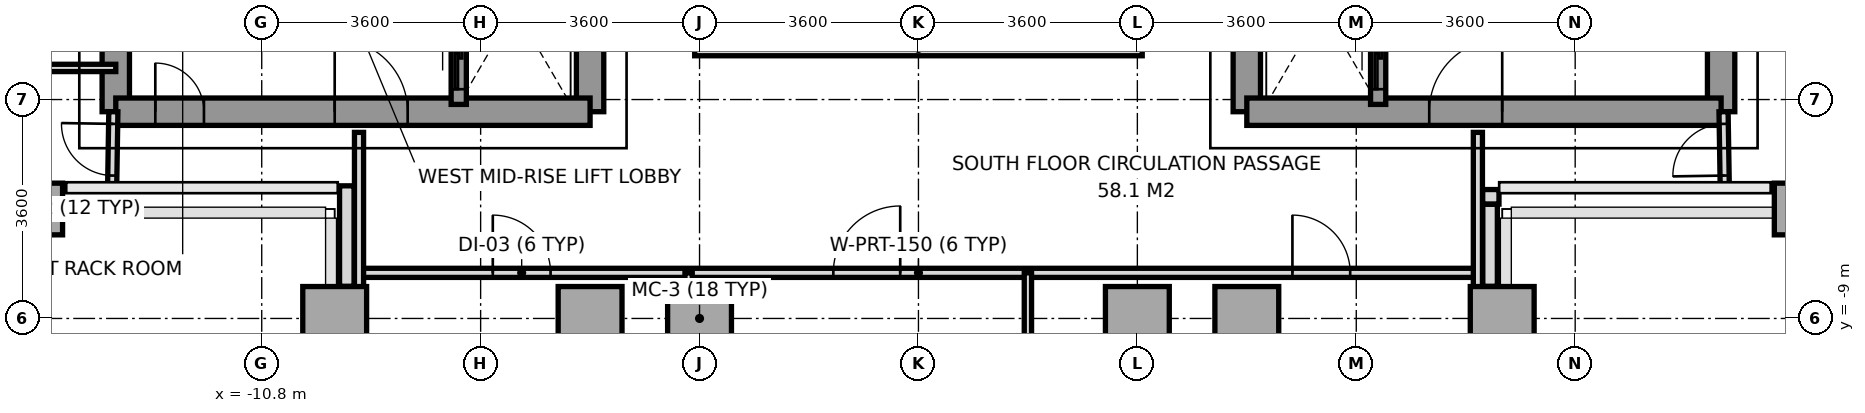
"""IFC4 building model, lengths in metres.
Left out: names, types, materials, properties, quantities, classifications, styles, units other than length and angle.
Written with IfcOpenShell. Run it as: python <this file> out.ifc"""

import sys

from ifc_helpers import new_model, si_unit, direction, frame, frame_2d, origin, origin_2d, place, context, subcontext, project, spatial, rectangle, extrude, source, transform, mapped, element, fill, save


model = new_model("IFC4")
c1 = context("Model", 3, precision=1e-05, world=origin(), true_north=direction((0.0, 1.0)))
c2 = subcontext(c1, "Body", "Model", "MODEL_VIEW")
j1 = project(units=[si_unit("LENGTHUNIT", "METRE"), si_unit("PLANEANGLEUNIT", "RADIAN")], contexts=[c1])
p1 = place(None, origin())
s1 = spatial("IfcSite", under=j1, at=p1, CompositionType="ELEMENT")
p2 = place(p1, origin())
s2 = spatial("IfcBuilding", under=s1, at=p2, CompositionType="ELEMENT")
p3 = place(p2, frame((0.0, 0.0, 141.4)))
s3 = spatial("IfcBuildingStorey", under=s2, at=p3, CompositionType="ELEMENT", Elevation=141.4)
m1 = source(origin(), c2, "Body", "SweptSolid", [
    extrude(rectangle(XDim=0.65, YDim=0.85, at=origin_2d()), origin(), (0.0, 0.0, 1.0), 3.2),
])
p4 = place(p3, frame((-14.4, -7.2, 0.0), z_axis=(0.0, 0.0, 1.0), x_axis=(1.0, 0.0, 0.0)))
e1 = element("IfcColumn", 1, at=p4, inside=s3, PredefinedType="COLUMN", context=c2, shape_type="MappedRepresentation", body=[
    mapped(m1, transform((0.0, 0.0, 0.0), x_axis=(1.0, 0.0, 0.0), y_axis=(0.0, 1.0, 0.0), z_axis=(0.0, 0.0, 1.0), scale=1.0)),
])
m2 = source(origin(), c2, "Body", "SweptSolid", [
    extrude(rectangle(XDim=1.05, YDim=1.05, at=origin_2d()), origin(), (0.0, 0.0, 1.0), 3.2),
])
for number, where, z_axis, x_axis in (
    (2, (-9.6, -9.0, 0.0), (0.0, 0.0, 1.0), (1.0, 0.0, 0.0)),
    (3, (-5.4, -9.0, 0.0), (0.0, 0.0, 1.0), (1.0, 0.0, 0.0)),
    (4, (-3.6, -9.0, 0.0), (0.0, 0.0, 1.0), (1.0, 0.0, 0.0)),
    (5, (3.6, -9.0, 0.0), (0.0, 0.0, 1.0), (1.0, 0.0, 0.0)),
    (6, (5.4, -9.0, 0.0), (0.0, 0.0, 1.0), (1.0, 0.0, 0.0)),
    (7, (9.6, -9.0, 0.0), (0.0, 0.0, 1.0), (1.0, 0.0, 0.0)),
):
    element("IfcColumn", number, at=place(p3, frame(where, z_axis=z_axis, x_axis=x_axis)), inside=s3, PredefinedType="COLUMN", context=c2, shape_type="MappedRepresentation", body=[
        mapped(m2, transform((0.0, 0.0, 0.0), x_axis=(1.0, 0.0, 0.0), y_axis=(0.0, 1.0, 0.0), z_axis=(0.0, 0.0, 1.0), scale=1.0)),
    ])
p5 = place(p3, frame((14.4, -7.2, 0.0), z_axis=(0.0, 0.0, 1.0), x_axis=(1.0, 0.0, 0.0)))
e8 = element("IfcColumn", 8, at=p5, inside=s3, PredefinedType="COLUMN", context=c2, shape_type="MappedRepresentation", body=[
    mapped(m1, transform((0.0, 0.0, 0.0), x_axis=(1.0, 0.0, 0.0), y_axis=(0.0, 1.0, 0.0), z_axis=(0.0, 0.0, 1.0), scale=1.0)),
])
p6 = place(p3, frame((9.547, -7.0, 0.0), z_axis=(0.0, 0.0, 1.0), x_axis=(-1.0, 0.0, 0.0)))
e9 = element("IfcWall", 9, at=p6, inside=s3, PredefinedType="PARAPET", context=c2, shape_type="SweptSolid", body=[
    extrude(rectangle(XDim=0.269, YDim=0.24, at=frame_2d((0.135, 0.0))), origin(), (0.0, 0.0, 1.0), 1.15),
])
p7 = place(p3, frame((9.4, -7.123, 0.0), z_axis=(0.0, 0.0, 1.0), x_axis=(0.0, -1.0, 0.0)))
e10 = element("IfcWall", 10, at=p7, inside=s3, PredefinedType="PARAPET", context=c2, shape_type="SweptSolid", body=[
    extrude(rectangle(XDim=1.349, YDim=0.24, at=frame_2d((0.674, 0.0))), origin(), (0.0, 0.0, 1.0), 1.15),
])
p8 = place(p3, frame((-9.4, -8.472, 0.0), z_axis=(0.0, 0.0, 1.0), x_axis=(0.0, 1.0, 0.0)))
e11 = element("IfcWall", 11, at=p8, inside=s3, PredefinedType="PARAPET", context=c2, shape_type="SweptSolid", body=[
    extrude(rectangle(XDim=1.653, YDim=0.24, at=frame_2d((0.827, 0.0))), origin(), (0.0, 0.0, 1.0), 1.15),
])
p9 = place(p3, frame((-13.2, -5.6, 0.0), z_axis=(0.0, 0.0, 1.0), x_axis=(0.0, 1.0, 0.0)))
e12 = element("IfcWall", 12, at=p9, inside=s3, PredefinedType="SHEAR", context=c2, shape_type="SweptSolid", body=[
    extrude(rectangle(XDim=11.2, YDim=0.45, at=frame_2d((5.6, 0.0))), origin(), (0.0, 0.0, 1.0), 3.2),
])
p10 = place(p3, frame((-5.4, -5.6, 0.0), z_axis=(0.0, 0.0, 1.0), x_axis=(0.0, 1.0, 0.0)))
e13 = element("IfcWall", 13, at=p10, inside=s3, PredefinedType="SHEAR", context=c2, shape_type="SweptSolid", body=[
    extrude(rectangle(XDim=12.5, YDim=0.45, at=frame_2d((6.25, 0.0))), origin(), (0.0, 0.0, 1.0), 3.2),
])
p11 = place(p10, frame((4.55, 0.0, 0.0)))
e14 = element("IfcOpeningElement", 14, at=p11, cuts=e13, PredefinedType="OPENING", context=c2, shape_type="SweptSolid", body=[
    extrude(rectangle(XDim=1.2, YDim=2.2, at=frame_2d((0.6, 1.1))), frame((0.0, 0.235, 0.0), z_axis=(0.0, -1.0, 0.0), x_axis=(1.0, 0.0, 0.0)), (0.0, 0.0, 1.0), 0.47),
])
p12 = place(p10, frame((6.86, 0.0, 0.0)))
e15 = element("IfcOpeningElement", 15, at=p12, cuts=e13, PredefinedType="OPENING", context=c2, shape_type="SweptSolid", body=[
    extrude(rectangle(XDim=0.8, YDim=2.1, at=frame_2d((0.4, 1.05))), frame((0.0, 0.235, 0.0), z_axis=(0.0, -1.0, 0.0), x_axis=(1.0, 0.0, 0.0)), (0.0, 0.0, 1.0), 0.47),
])
p13 = place(p3, frame((-13.2, -5.6, 0.0), z_axis=(0.0, 0.0, 1.0), x_axis=(1.0, 0.0, 0.0)))
e16 = element("IfcWall", 16, at=p13, inside=s3, PredefinedType="SHEAR", context=c2, shape_type="SweptSolid", body=[
    extrude(rectangle(XDim=7.8, YDim=0.45, at=frame_2d((3.9, 0.0))), origin(), (0.0, 0.0, 1.0), 3.2),
])
p14 = place(p13, frame((3.6, 0.0, 0.0)))
e17 = element("IfcOpeningElement", 17, at=p14, cuts=e16, PredefinedType="OPENING", context=c2, shape_type="SweptSolid", body=[
    extrude(rectangle(XDim=1.2, YDim=2.2, at=frame_2d((0.6, 1.1))), frame((0.0, 0.235, 0.0), z_axis=(0.0, -1.0, 0.0), x_axis=(1.0, 0.0, 0.0)), (0.0, 0.0, 1.0), 0.47),
])
p15 = place(p13, frame((0.65, 0.0, 0.0)))
e18 = element("IfcOpeningElement", 18, at=p15, cuts=e16, PredefinedType="OPENING", context=c2, shape_type="SweptSolid", body=[
    extrude(rectangle(XDim=0.8, YDim=2.1, at=frame_2d((0.4, 1.05))), frame((0.0, 0.235, 0.0), z_axis=(0.0, -1.0, 0.0), x_axis=(1.0, 0.0, 0.0)), (0.0, 0.0, 1.0), 0.47),
])
p16 = place(p3, frame((13.2, -5.6, 0.0), z_axis=(0.0, 0.0, 1.0), x_axis=(0.0, 1.0, 0.0)))
e19 = element("IfcWall", 19, at=p16, inside=s3, PredefinedType="SHEAR", context=c2, shape_type="SweptSolid", body=[
    extrude(rectangle(XDim=11.2, YDim=0.45, at=frame_2d((5.6, 0.0))), origin(), (0.0, 0.0, 1.0), 3.2),
])
p17 = place(p3, frame((5.4, -5.6, 0.0), z_axis=(0.0, 0.0, 1.0), x_axis=(0.0, 1.0, 0.0)))
e20 = element("IfcWall", 20, at=p17, inside=s3, PredefinedType="SHEAR", context=c2, shape_type="SweptSolid", body=[
    extrude(rectangle(XDim=12.5, YDim=0.45, at=frame_2d((6.25, 0.0))), origin(), (0.0, 0.0, 1.0), 3.2),
])
p18 = place(p17, frame((4.55, 0.0, 0.0)))
e21 = element("IfcOpeningElement", 21, at=p18, cuts=e20, PredefinedType="OPENING", context=c2, shape_type="SweptSolid", body=[
    extrude(rectangle(XDim=1.2, YDim=2.2, at=frame_2d((0.6, 1.1))), frame((0.0, 0.235, 0.0), z_axis=(0.0, -1.0, 0.0), x_axis=(1.0, 0.0, 0.0)), (0.0, 0.0, 1.0), 0.47),
])
p19 = place(p17, frame((6.86, 0.0, 0.0)))
e22 = element("IfcOpeningElement", 22, at=p19, cuts=e20, PredefinedType="OPENING", context=c2, shape_type="SweptSolid", body=[
    extrude(rectangle(XDim=0.8, YDim=2.1, at=frame_2d((0.4, 1.05))), frame((0.0, 0.235, 0.0), z_axis=(0.0, -1.0, 0.0), x_axis=(1.0, 0.0, 0.0)), (0.0, 0.0, 1.0), 0.47),
])
p20 = place(p3, frame((5.4, -5.6, 0.0), z_axis=(0.0, 0.0, 1.0), x_axis=(1.0, 0.0, 0.0)))
e23 = element("IfcWall", 23, at=p20, inside=s3, PredefinedType="SHEAR", context=c2, shape_type="SweptSolid", body=[
    extrude(rectangle(XDim=7.8, YDim=0.45, at=frame_2d((3.9, 0.0))), origin(), (0.0, 0.0, 1.0), 3.2),
])
p21 = place(p20, frame((3.0, 0.0, 0.0)))
e24 = element("IfcOpeningElement", 24, at=p21, cuts=e23, PredefinedType="OPENING", context=c2, shape_type="SweptSolid", body=[
    extrude(rectangle(XDim=1.2, YDim=2.2, at=frame_2d((0.6, 1.1))), frame((0.0, 0.235, 0.0), z_axis=(0.0, -1.0, 0.0), x_axis=(1.0, 0.0, 0.0)), (0.0, 0.0, 1.0), 0.47),
])
p22 = place(p3, frame((-7.56, -5.48, 0.0), z_axis=(0.0, 0.0, 1.0), x_axis=(0.0, 1.0, 0.0)))
e25 = element("IfcWall", 25, at=p22, inside=s3, PredefinedType="SOLIDWALL", context=c2, shape_type="SweptSolid", body=[
    extrude(rectangle(XDim=1.6, YDim=0.25, at=frame_2d((0.8, 0.0))), origin(), (0.0, 0.0, 1.0), 3.2),
])
p23 = place(p22, frame((0.25, 0.0, 0.0)))
e26 = element("IfcOpeningElement", 26, at=p23, cuts=e25, PredefinedType="OPENING", context=c2, shape_type="SweptSolid", body=[
    extrude(rectangle(XDim=1.1, YDim=2.2, at=frame_2d((0.55, 1.1))), frame((0.0, 0.135, 0.0), z_axis=(0.0, -1.0, 0.0), x_axis=(1.0, 0.0, 0.0)), (0.0, 0.0, 1.0), 0.27),
])
p24 = place(p3, frame((7.56, -5.48, 0.0), z_axis=(0.0, 0.0, 1.0), x_axis=(0.0, 1.0, 0.0)))
e27 = element("IfcWall", 27, at=p24, inside=s3, PredefinedType="SOLIDWALL", context=c2, shape_type="SweptSolid", body=[
    extrude(rectangle(XDim=1.6, YDim=0.25, at=frame_2d((0.8, 0.0))), origin(), (0.0, 0.0, 1.0), 3.2),
])
p25 = place(p24, frame((0.25, 0.0, 0.0)))
e28 = element("IfcOpeningElement", 28, at=p25, cuts=e27, PredefinedType="OPENING", context=c2, shape_type="SweptSolid", body=[
    extrude(rectangle(XDim=1.1, YDim=2.2, at=frame_2d((0.55, 1.1))), frame((0.0, 0.135, 0.0), z_axis=(0.0, -1.0, 0.0), x_axis=(1.0, 0.0, 0.0)), (0.0, 0.0, 1.0), 0.27),
])
p26 = place(p3, frame((-9.2, -8.25, 0.0), z_axis=(0.0, 0.0, 1.0), x_axis=(1.0, 0.0, 0.0)))
e29 = element("IfcWall", 29, at=p26, inside=s3, PredefinedType="PARTITIONING", context=c2, shape_type="SweptSolid", body=[
    extrude(rectangle(XDim=18.4, YDim=0.15, at=frame_2d((9.2, 0.0))), origin(), (0.0, 0.0, 1.0), 2.75),
])
p27 = place(p26, frame((2.2, 0.0, 0.0)))
e30 = element("IfcOpeningElement", 30, at=p27, cuts=e29, PredefinedType="OPENING", context=c2, shape_type="SweptSolid", body=[
    extrude(rectangle(XDim=0.95, YDim=2.15, at=frame_2d((0.475, 1.075))), frame((0.0, 0.085, 0.0), z_axis=(0.0, -1.0, 0.0), x_axis=(1.0, 0.0, 0.0)), (0.0, 0.0, 1.0), 0.17),
])
p28 = place(p26, frame((7.8, 0.0, 0.0)))
e31 = element("IfcOpeningElement", 31, at=p28, cuts=e29, PredefinedType="OPENING", context=c2, shape_type="SweptSolid", body=[
    extrude(rectangle(XDim=1.1, YDim=2.2, at=frame_2d((0.55, 1.1))), frame((0.0, 0.085, 0.0), z_axis=(0.0, -1.0, 0.0), x_axis=(1.0, 0.0, 0.0)), (0.0, 0.0, 1.0), 0.17),
])
p29 = place(p26, frame((15.35, 0.0, 0.0)))
e32 = element("IfcOpeningElement", 32, at=p29, cuts=e29, PredefinedType="OPENING", context=c2, shape_type="SweptSolid", body=[
    extrude(rectangle(XDim=0.95, YDim=2.15, at=frame_2d((0.475, 1.075))), frame((0.0, 0.085, 0.0), z_axis=(0.0, -1.0, 0.0), x_axis=(1.0, 0.0, 0.0)), (0.0, 0.0, 1.0), 0.17),
])
for number, where, z_axis, x_axis in (
    (33, (-9.2, -15.68, 0.0), (0.0, 0.0, 1.0), (0.0, 1.0, 0.0)),
    (34, (9.2, -15.68, 0.0), (0.0, 0.0, 1.0), (0.0, 1.0, 0.0)),
):
    element("IfcWall", number, at=place(p3, frame(where, z_axis=z_axis, x_axis=x_axis)), inside=s3, PredefinedType="PARTITIONING", context=c2, shape_type="SweptSolid", body=[
        extrude(rectangle(XDim=9.74, YDim=0.15, at=frame_2d((4.87, 0.0))), origin(), (0.0, 0.0, 1.0), 2.7),
    ])
for number, where, z_axis, x_axis in (
    (35, (-3.78, -24.65, 0.0), (0.0, 0.0, 1.0), (0.0, 1.0, 0.0)),
    (36, (1.8, -24.65, 0.0), (0.0, 0.0, 1.0), (0.0, 1.0, 0.0)),
):
    element("IfcWall", number, at=place(p3, frame(where, z_axis=z_axis, x_axis=x_axis)), inside=s3, PredefinedType="PARTITIONING", context=c2, shape_type="SweptSolid", body=[
        extrude(rectangle(XDim=16.4, YDim=0.12, at=frame_2d((8.2, 0.0))), origin(), (0.0, 0.0, 1.0), 2.7),
    ])
p30 = place(p3, frame((-13.26, -6.85, 0.0), z_axis=(0.0, 0.0, 1.0), x_axis=(0.016013571389, 0.999871774545, 0.0)))
e37 = element("IfcWall", 37, at=p30, inside=s3, PredefinedType="PARTITIONING", context=c2, shape_type="SweptSolid", body=[
    extrude(rectangle(XDim=1.25, YDim=0.15, at=frame_2d((0.625, 0.0))), origin(), (0.0, 0.0, 1.0), 3.2),
])
p31 = place(p30, frame((0.2, 0.0, 0.0)))
e38 = element("IfcOpeningElement", 38, at=p31, cuts=e37, PredefinedType="OPENING", context=c2, shape_type="SweptSolid", body=[
    extrude(rectangle(XDim=0.85, YDim=2.1, at=frame_2d((0.425, 1.05))), frame((0.0, 0.085, 0.0), z_axis=(0.0, -1.0, 0.0), x_axis=(1.0, 0.0, 0.0)), (0.0, 0.0, 1.0), 0.17),
])
p32 = place(p3, frame((-19.17, -4.88, 0.0), z_axis=(0.0, 0.0, 1.0), x_axis=(1.0, 0.0, 0.0)))
e39 = element("IfcWall", 39, at=p32, inside=s3, PredefinedType="PARTITIONING", context=c2, shape_type="SweptSolid", body=[
    extrude(rectangle(XDim=5.97, YDim=0.12, at=frame_2d((2.985, 0.0))), origin(), (0.0, 0.0, 1.0), 2.75),
])
p33 = place(p32, frame((1.45, 0.0, 0.0)))
e40 = element("IfcOpeningElement", 40, at=p33, cuts=e39, PredefinedType="OPENING", context=c2, shape_type="SweptSolid", body=[
    extrude(rectangle(XDim=0.95, YDim=2.15, at=frame_2d((0.475, 1.075))), frame((0.0, 0.07, 0.0), z_axis=(0.0, -1.0, 0.0), x_axis=(1.0, 0.0, 0.0)), (0.0, 0.0, 1.0), 0.14),
])
p34 = place(p3, frame((13.26, -6.85, 0.0), z_axis=(0.0, 0.0, 1.0), x_axis=(-0.016013571389, 0.999871774545, 0.0)))
e41 = element("IfcWall", 41, at=p34, inside=s3, PredefinedType="PARTITIONING", context=c2, shape_type="SweptSolid", body=[
    extrude(rectangle(XDim=1.25, YDim=0.15, at=frame_2d((0.625, 0.0))), origin(), (0.0, 0.0, 1.0), 3.2),
])
p35 = place(p34, frame((0.2, 0.0, 0.0)))
e42 = element("IfcOpeningElement", 42, at=p35, cuts=e41, PredefinedType="OPENING", context=c2, shape_type="SweptSolid", body=[
    extrude(rectangle(XDim=0.85, YDim=2.1, at=frame_2d((0.425, 1.05))), frame((0.0, 0.085, 0.0), z_axis=(0.0, -1.0, 0.0), x_axis=(1.0, 0.0, 0.0)), (0.0, 0.0, 1.0), 0.17),
])
p36 = place(p3, frame((-3.68, -4.56, 0.0), z_axis=(0.0, 0.0, 1.0), x_axis=(1.0, 0.0, 0.0)))
e43 = element("IfcWall", 43, at=p36, inside=s3, PredefinedType="PARAPET", context=c2, shape_type="SweptSolid", body=[
    extrude(rectangle(XDim=7.36, YDim=0.24, at=frame_2d((3.68, 0.0))), origin(), (0.0, 0.0, 1.0), 1.15),
])
m3 = source(origin(), c2, "Body", "SweptSolid", [
    extrude(rectangle(XDim=1.2, YDim=2.2, at=frame_2d((0.6, 1.1))), frame((0.0, 0.025, 0.0), z_axis=(0.0, -1.0, 0.0), x_axis=(1.0, 0.0, 0.0)), (0.0, 0.0, 1.0), 0.05),
])
p37 = place(p14, origin())
e44 = element("IfcDoor", 44, at=p37, inside=s3, OperationType="SINGLE_SWING_LEFT", PredefinedType="DOOR", context=c2, shape_type="MappedRepresentation", body=[
    mapped(m3, transform((0.0, 0.0, 0.0), x_axis=(1.0, 0.0, 0.0), y_axis=(0.0, 1.0, 0.0), z_axis=(0.0, 0.0, 1.0), scale=1.0)),
])
fill(e17, e44)
p38 = place(p21, origin())
e45 = element("IfcDoor", 45, at=p38, inside=s3, OperationType="SINGLE_SWING_RIGHT", PredefinedType="DOOR", context=c2, shape_type="MappedRepresentation", body=[
    mapped(m3, transform((0.0, 0.0, 0.0), x_axis=(1.0, 0.0, 0.0), y_axis=(0.0, 1.0, 0.0), z_axis=(0.0, 0.0, 1.0), scale=1.0)),
])
fill(e24, e45)
m4 = source(origin(), c2, "Body", "SweptSolid", [
    extrude(rectangle(XDim=0.8, YDim=2.1, at=frame_2d((0.4, 1.05))), frame((0.0, 0.025, 0.0), z_axis=(0.0, -1.0, 0.0), x_axis=(1.0, 0.0, 0.0)), (0.0, 0.0, 1.0), 0.05),
])
p39 = place(p15, origin())
e46 = element("IfcDoor", 46, at=p39, inside=s3, OperationType="SINGLE_SWING_LEFT", PredefinedType="DOOR", context=c2, shape_type="MappedRepresentation", body=[
    mapped(m4, transform((0.0, 0.0, 0.0), x_axis=(1.0, 0.0, 0.0), y_axis=(0.0, 1.0, 0.0), z_axis=(0.0, 0.0, 1.0), scale=1.0)),
])
fill(e18, e46)
m5 = source(origin(), c2, "Body", "SweptSolid", [
    extrude(rectangle(XDim=1.1, YDim=2.2, at=frame_2d((0.55, 1.1))), frame((0.0, 0.025, 0.0), z_axis=(0.0, -1.0, 0.0), x_axis=(1.0, 0.0, 0.0)), (0.0, 0.0, 1.0), 0.05),
])
p40 = place(p23, origin())
e47 = element("IfcDoor", 47, at=p40, inside=s3, OperationType="SLIDING_TO_LEFT", PredefinedType="DOOR", context=c2, shape_type="MappedRepresentation", body=[
    mapped(m5, transform((0.0, 0.0, 0.0), x_axis=(1.0, 0.0, 0.0), y_axis=(0.0, 1.0, 0.0), z_axis=(0.0, 0.0, 1.0), scale=1.0)),
])
fill(e26, e47)
p41 = place(p25, origin())
e48 = element("IfcDoor", 48, at=p41, inside=s3, OperationType="SLIDING_TO_LEFT", PredefinedType="DOOR", context=c2, shape_type="MappedRepresentation", body=[
    mapped(m5, transform((0.0, 0.0, 0.0), x_axis=(1.0, 0.0, 0.0), y_axis=(0.0, 1.0, 0.0), z_axis=(0.0, 0.0, 1.0), scale=1.0)),
])
fill(e28, e48)
m6 = source(origin(), c2, "Body", "SweptSolid", [
    extrude(rectangle(XDim=0.95, YDim=2.15, at=frame_2d((0.475, 1.075))), frame((0.0, 0.025, 0.0), z_axis=(0.0, -1.0, 0.0), x_axis=(1.0, 0.0, 0.0)), (0.0, 0.0, 1.0), 0.05),
])
p42 = place(p27, origin())
e49 = element("IfcDoor", 49, at=p42, inside=s3, OperationType="SINGLE_SWING_LEFT", PredefinedType="DOOR", context=c2, shape_type="MappedRepresentation", body=[
    mapped(m6, transform((0.0, 0.0, 0.0), x_axis=(1.0, 0.0, 0.0), y_axis=(0.0, 1.0, 0.0), z_axis=(0.0, 0.0, 1.0), scale=1.0)),
])
fill(e30, e49)
p43 = place(p28, origin())
e50 = element("IfcDoor", 50, at=p43, inside=s3, OperationType="SINGLE_SWING_RIGHT", PredefinedType="DOOR", context=c2, shape_type="MappedRepresentation", body=[
    mapped(m5, transform((0.0, 0.0, 0.0), x_axis=(1.0, 0.0, 0.0), y_axis=(0.0, 1.0, 0.0), z_axis=(0.0, 0.0, 1.0), scale=1.0)),
])
fill(e31, e50)
p44 = place(p29, origin())
e51 = element("IfcDoor", 51, at=p44, inside=s3, OperationType="SINGLE_SWING_LEFT", PredefinedType="DOOR", context=c2, shape_type="MappedRepresentation", body=[
    mapped(m6, transform((0.0, 0.0, 0.0), x_axis=(1.0, 0.0, 0.0), y_axis=(0.0, 1.0, 0.0), z_axis=(0.0, 0.0, 1.0), scale=1.0)),
])
fill(e32, e51)
m7 = source(origin(), c2, "Body", "SweptSolid", [
    extrude(rectangle(XDim=0.85, YDim=2.1, at=frame_2d((0.425, 1.05))), frame((0.0, 0.025, 0.0), z_axis=(0.0, -1.0, 0.0), x_axis=(1.0, 0.0, 0.0)), (0.0, 0.0, 1.0), 0.05),
])
p45 = place(p31, origin())
e52 = element("IfcDoor", 52, at=p45, inside=s3, OperationType="SINGLE_SWING_RIGHT", PredefinedType="DOOR", context=c2, shape_type="MappedRepresentation", body=[
    mapped(m7, transform((0.0, 0.0, 0.0), x_axis=(1.0, 0.0, 0.0), y_axis=(0.0, 1.0, 0.0), z_axis=(0.0, 0.0, 1.0), scale=1.0)),
])
fill(e38, e52)
p46 = place(p35, origin())
e53 = element("IfcDoor", 53, at=p46, inside=s3, OperationType="SINGLE_SWING_LEFT", PredefinedType="DOOR", context=c2, shape_type="MappedRepresentation", body=[
    mapped(m7, transform((0.0, 0.0, 0.0), x_axis=(1.0, 0.0, 0.0), y_axis=(0.0, 1.0, 0.0), z_axis=(0.0, 0.0, 1.0), scale=1.0)),
])
fill(e42, e53)
save(model, sys.argv[1])
